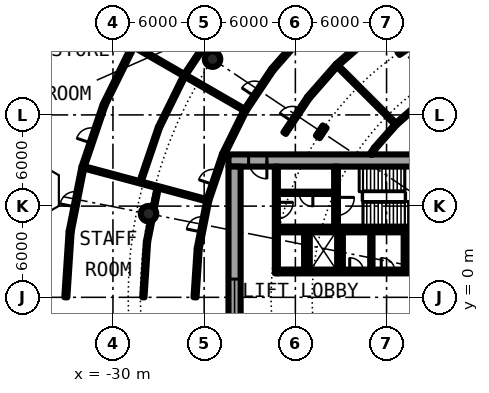
"""IFC4 building model, lengths in metres.
Left out: names, types, materials, properties, quantities, classifications, styles, units other than length and angle.
Written with IfcOpenShell. Run it as: python <this file> out.ifc"""

import sys

from ifc_helpers import new_model, si_unit, direction, frame, frame_2d, origin, origin_2d, place, context, subcontext, project, spatial, rectangle, hollow_circle, i_section, extrude, element, fill, save


model = new_model("IFC4")
c1 = context("Model", 3, precision=1e-05, world=origin(), true_north=direction((0.0, 1.0)))
c2 = subcontext(c1, "Body", "Model", "MODEL_VIEW")
j1 = project(units=[si_unit("LENGTHUNIT", "METRE"), si_unit("PLANEANGLEUNIT", "RADIAN")], contexts=[c1])
p1 = place(None, origin())
s1 = spatial("IfcSite", under=j1, at=p1, CompositionType="ELEMENT")
p2 = place(p1, origin())
s2 = spatial("IfcBuilding", under=s1, at=p2, CompositionType="ELEMENT")
p3 = place(p2, frame((0.0, 0.0, 5.4)))
s3 = spatial("IfcBuildingStorey", under=s2, at=p3, CompositionType="ELEMENT", Elevation=5.4)
for number, where, z_axis, x_axis in (
    (1, (-23.448, 15.667, 0.0), (0.0, 0.0, 1.0), (1.0, 0.0, 0.0)),
    (2, (-27.658, 5.501, 0.0), (0.0, 0.0, 1.0), (1.0, 0.0, 0.0)),
):
    element("IfcColumn", number, at=place(p3, frame(where, z_axis=z_axis, x_axis=x_axis)), inside=s3, PredefinedType="COLUMN", context=c2, shape_type="SweptSolid", body=[
        extrude(hollow_circle(Radius=0.508, WallThickness=0.05, at=origin_2d()), origin(), (0.0, 0.0, 1.0), 4.2),
    ])
for number, where, z_axis, x_axis in (
    (3, (-10.889, 16.297, 0.0), (0.0, 0.0, 1.0), (-0.556, 0.831, 0.0)),
    (4, (-16.297, 10.889, 0.0), (0.0, 0.0, 1.0), (-0.831, 0.556, 0.0)),
):
    element("IfcColumn", number, at=place(p3, frame(where, z_axis=z_axis, x_axis=x_axis)), inside=s3, PredefinedType="COLUMN", context=c2, shape_type="SweptSolid", body=[
        extrude(i_section(OverallWidth=0.303, OverallDepth=0.814, WebThickness=0.021, FlangeThickness=0.04, FilletRadius=0.03, at=origin_2d()), origin(), (0.0, 0.0, 1.0), 4.2),
    ])
p4 = place(p3, frame((-8.2, 9.0, 0.0), z_axis=(0.0, 0.0, 1.0), x_axis=(-1.0, 0.0, 0.0)))
e5 = element("IfcWall", 5, at=p4, inside=s3, PredefinedType="SHEAR", context=c2, shape_type="SweptSolid", body=[
    extrude(rectangle(XDim=14.2, YDim=0.8, at=frame_2d((7.1, 0.0))), origin(), (0.0, 0.0, 1.0), 4.2),
])
p5 = place(p4, frame((11.675, 0.0, 0.0)))
e6 = element("IfcOpeningElement", 6, at=p5, cuts=e5, PredefinedType="OPENING", context=c2, shape_type="SweptSolid", body=[
    extrude(rectangle(XDim=1.2, YDim=2.3, at=frame_2d((0.6, 1.15))), frame((0.0, 0.41, 0.0), z_axis=(0.0, -1.0, 0.0), x_axis=(1.0, 0.0, 0.0)), (0.0, 0.0, 1.0), 0.82),
])
p6 = place(p3, frame((-22.0, 8.6, 0.0), z_axis=(0.0, 0.0, 1.0), x_axis=(0.0, -1.0, 0.0)))
e7 = element("IfcWall", 7, at=p6, inside=s3, PredefinedType="SHEAR", context=c2, shape_type="SweptSolid", body=[
    extrude(rectangle(XDim=17.2, YDim=0.8, at=frame_2d((8.6, 0.0))), origin(), (0.0, 0.0, 1.0), 4.2),
])
p7 = place(p6, frame((7.4, 0.0, 0.1)))
e8 = element("IfcOpeningElement", 8, at=p7, cuts=e7, PredefinedType="OPENING", context=c2, shape_type="SweptSolid", body=[
    extrude(rectangle(XDim=2.4, YDim=2.2, at=frame_2d((1.2, 1.1))), frame((0.0, 0.41, 0.0), z_axis=(0.0, -1.0, 0.0), x_axis=(1.0, 0.0, 0.0)), (0.0, 0.0, 1.0), 0.82),
])
p8 = place(p3, frame((-19.15, 1.7, 0.0), z_axis=(0.0, 0.0, 1.0), x_axis=(1.0, 0.0, 0.0)))
e9 = element("IfcWall", 9, at=p8, inside=s3, PredefinedType="SHEAR", context=c2, shape_type="SweptSolid", body=[
    extrude(rectangle(XDim=10.15, YDim=0.25, at=frame_2d((5.075, 0.0))), origin(), (0.0, 0.0, 1.0), 4.2),
])
p9 = place(p8, frame((2.45, 0.0, 0.0)))
e10 = element("IfcOpeningElement", 10, at=p9, cuts=e9, PredefinedType="OPENING", context=c2, shape_type="SweptSolid", body=[
    extrude(rectangle(XDim=1.1, YDim=2.3, at=frame_2d((0.55, 1.15))), frame((0.0, 0.135, 0.0), z_axis=(0.0, -1.0, 0.0), x_axis=(1.0, 0.0, 0.0)), (0.0, 0.0, 1.0), 0.27),
])
p10 = place(p8, frame((8.837, 0.0, 0.0)))
e11 = element("IfcOpeningElement", 11, at=p10, cuts=e9, PredefinedType="OPENING", context=c2, shape_type="SweptSolid", body=[
    extrude(rectangle(XDim=0.9, YDim=2.3, at=frame_2d((0.45, 1.15))), frame((0.0, 0.135, 0.0), z_axis=(0.0, -1.0, 0.0), x_axis=(1.0, 0.0, 0.0)), (0.0, 0.0, 1.0), 0.27),
])
p11 = place(p8, frame((6.8, 0.0, 0.0)))
e12 = element("IfcOpeningElement", 12, at=p11, cuts=e9, PredefinedType="OPENING", context=c2, shape_type="SweptSolid", body=[
    extrude(rectangle(XDim=0.9, YDim=2.3, at=frame_2d((0.45, 1.15))), frame((0.0, 0.135, 0.0), z_axis=(0.0, -1.0, 0.0), x_axis=(1.0, 0.0, 0.0)), (0.0, 0.0, 1.0), 0.27),
])
p12 = place(p8, frame((4.725, 0.0, 0.0)))
e13 = element("IfcOpeningElement", 13, at=p12, cuts=e9, PredefinedType="OPENING", context=c2, shape_type="SweptSolid", body=[
    extrude(rectangle(XDim=0.9, YDim=2.3, at=frame_2d((0.45, 1.15))), frame((0.0, 0.135, 0.0), z_axis=(0.0, -1.0, 0.0), x_axis=(1.0, 0.0, 0.0)), (0.0, 0.0, 1.0), 0.27),
])
p13 = place(p3, frame((-9.0, 4.462, 0.0), z_axis=(0.0, 0.0, 1.0), x_axis=(-1.0, 0.0, 0.0)))
e14 = element("IfcWall", 14, at=p13, inside=s3, PredefinedType="SHEAR", context=c2, shape_type="SweptSolid", body=[
    extrude(rectangle(XDim=10.15, YDim=0.375, at=frame_2d((5.075, 0.0))), origin(), (0.0, 0.0, 1.0), 4.2),
])
p14 = place(p3, frame((-15.325, 8.6, 0.0), z_axis=(0.0, 0.0, 1.0), x_axis=(0.0, -1.0, 0.0)))
e15 = element("IfcWall", 15, at=p14, inside=s3, PredefinedType="SHEAR", context=c2, shape_type="SweptSolid", body=[
    extrude(rectangle(XDim=3.95, YDim=0.25, at=frame_2d((1.975, 0.0))), origin(), (0.0, 0.0, 1.0), 4.2),
])
p15 = place(p14, frame((2.025, 0.0, 0.0)))
e16 = element("IfcOpeningElement", 16, at=p15, cuts=e15, PredefinedType="OPENING", context=c2, shape_type="SweptSolid", body=[
    extrude(rectangle(XDim=1.2, YDim=2.3, at=frame_2d((0.6, 1.15))), frame((0.0, 0.135, 0.0), z_axis=(0.0, -1.0, 0.0), x_axis=(1.0, 0.0, 0.0)), (0.0, 0.0, 1.0), 0.27),
])
for number, where, z_axis, x_axis in (
    (17, (-15.0, 1.825, 0.0), (0.0, 0.0, 1.0), (0.0, 1.0, 0.0)),
    (18, (-17.3, 1.825, 0.0), (0.0, 0.0, 1.0), (0.0, 1.0, 0.0)),
):
    element("IfcWall", number, at=place(p3, frame(where, z_axis=z_axis, x_axis=x_axis)), inside=s3, PredefinedType="SOLIDWALL", context=c2, shape_type="SweptSolid", body=[
        extrude(rectangle(XDim=2.45, YDim=0.25, at=frame_2d((1.225, 0.0))), origin(), (0.0, 0.0, 1.0), 3.7),
    ])
p16 = place(p3, frame((-19.25, 8.6, 0.0), z_axis=(0.0, 0.0, 1.0), x_axis=(0.0, -1.0, 0.0)))
e19 = element("IfcWall", 19, at=p16, inside=s3, PredefinedType="SOLIDWALL", context=c2, shape_type="SweptSolid", body=[
    extrude(rectangle(XDim=7.025, YDim=0.2, at=frame_2d((3.513, 0.0))), origin(), (0.0, 0.0, 1.0), 3.7),
])
p17 = place(p16, frame((2.35, 0.0, 0.0)))
e20 = element("IfcOpeningElement", 20, at=p17, cuts=e19, PredefinedType="OPENING", context=c2, shape_type="SweptSolid", body=[
    extrude(rectangle(XDim=1.1, YDim=2.3, at=frame_2d((0.55, 1.15))), frame((0.0, 0.11, 0.0), z_axis=(0.0, -1.0, 0.0), x_axis=(1.0, 0.0, 0.0)), (0.0, 0.0, 1.0), 0.22),
])
for number, where, z_axis, x_axis in (
    (21, (-10.8, 1.825, 0.0), (0.0, 0.0, 1.0), (0.0, 1.0, 0.0)),
    (22, (-13.0, 1.825, 0.0), (0.0, 0.0, 1.0), (0.0, 1.0, 0.0)),
):
    element("IfcWall", number, at=place(p3, frame(where, z_axis=z_axis, x_axis=x_axis)), inside=s3, PredefinedType="PARTITIONING", context=c2, shape_type="SweptSolid", body=[
        extrude(rectangle(XDim=2.45, YDim=0.15, at=frame_2d((1.225, 0.0))), origin(), (0.0, 0.0, 1.0), 3.7),
    ])
p18 = place(p3, frame((-15.45, 6.875, 0.0), z_axis=(0.0, 0.0, 1.0), x_axis=(-1.0, 0.0, 0.0)))
e23 = element("IfcWall", 23, at=p18, inside=s3, PredefinedType="PARTITIONING", context=c2, shape_type="SweptSolid", body=[
    extrude(rectangle(XDim=3.7, YDim=0.15, at=frame_2d((1.85, 0.0))), origin(), (0.0, 0.0, 1.0), 3.7),
])
p19 = place(p18, frame((1.4, 0.0, 0.0)))
e24 = element("IfcOpeningElement", 24, at=p19, cuts=e23, PredefinedType="OPENING", context=c2, shape_type="SweptSolid", body=[
    extrude(rectangle(XDim=0.9, YDim=2.3, at=frame_2d((0.45, 1.15))), frame((0.0, 0.085, 0.0), z_axis=(0.0, -1.0, 0.0), x_axis=(1.0, 0.0, 0.0)), (0.0, 0.0, 1.0), 0.17),
])
for number, where, z_axis, x_axis in (
    (25, (-31.972, 8.568, 0.0), (0.0, 0.0, 1.0), (0.966, -0.259, 0.0)),
    (26, (-28.665, 16.55, 0.0), (0.0, 0.0, 1.0), (0.866, -0.5, 0.0)),
):
    element("IfcWall", number, at=place(p3, frame(where, z_axis=z_axis, x_axis=x_axis)), inside=s3, PredefinedType="PARTITIONING", context=c2, shape_type="SweptSolid", body=[
        extrude(rectangle(XDim=8.5, YDim=0.15, at=frame_2d((4.25, 0.0))), origin(), (0.0, 0.0, 1.0), 3.7),
    ])
p20 = place(p3, frame((-15.274, 15.274, 0.0), z_axis=(0.0, 0.0, 1.0), x_axis=(0.707106781187, -0.707106781187, 0.0)))
e27 = element("IfcWall", 27, at=p20, inside=s3, PredefinedType="PARTITIONING", context=c2, shape_type="SweptSolid", body=[
    extrude(rectangle(XDim=5.501, YDim=0.15, at=frame_2d((2.75, 0.0))), origin(), (0.0, 0.0, 1.0), 3.7),
])
p21 = place(p3, frame((-10.8, 18.706, 0.0), z_axis=(0.0, 0.0, 1.0), x_axis=(0.499882580657, -0.866093185261, 0.0)))
e28 = element("IfcWall", 28, at=p21, inside=s3, PredefinedType="PARTITIONING", context=c2, shape_type="SweptSolid", body=[
    extrude(rectangle(XDim=5.499, YDim=0.15, at=frame_2d((2.75, 0.0))), origin(), (0.0, 0.0, 1.0), 3.7),
])
p22 = place(p3, frame((-13.041, 9.4, 0.0), z_axis=(0.0, 0.0, 1.0), x_axis=(0.555634077892, 0.831426948977, 0.0)))
e29 = element("IfcWall", 29, at=p22, inside=s3, PredefinedType="PARTITIONING", context=c2, shape_type="SweptSolid", body=[
    extrude(rectangle(XDim=0.482, YDim=0.15, at=frame_2d((0.241, 0.0))), origin(), (0.0, 0.0, 1.0), 3.7),
])
for number, where, z_axis, x_axis in (
    (30, (-12.773, 9.801, 0.0), (0.0, 0.0, 1.0), (0.66, 0.752, 0.0)),
    (31, (-11.384, 11.384, 0.0), (0.0, 0.0, 1.0), (0.752, 0.66, 0.0)),
):
    element("IfcWall", number, at=place(p3, frame(where, z_axis=z_axis, x_axis=x_axis)), inside=s3, PredefinedType="PARTITIONING", context=c2, shape_type="SweptSolid", body=[
        extrude(rectangle(XDim=2.106, YDim=0.15, at=frame_2d((1.053, 0.0))), origin(), (0.0, 0.0, 1.0), 3.7),
    ])
p23 = place(p3, frame((-18.706, 10.8, 0.0), z_axis=(0.0, 0.0, 1.0), x_axis=(0.55571678686, 0.831371669473, 0.0)))
e32 = element("IfcWall", 32, at=p23, inside=s3, PredefinedType="PARTITIONING", context=c2, shape_type="SweptSolid", body=[
    extrude(rectangle(XDim=2.825, YDim=0.2, at=frame_2d((1.413, 0.0))), origin(), (0.0, 0.0, 1.0), 3.7),
])
p24 = place(p23, frame((0.913, 0.0, 0.0)))
e33 = element("IfcOpeningElement", 33, at=p24, cuts=e32, PredefinedType="OPENING", context=c2, shape_type="SweptSolid", body=[
    extrude(rectangle(XDim=1.0, YDim=2.3, at=frame_2d((0.5, 1.15))), frame((0.0, 0.11, 0.0), z_axis=(0.0, -1.0, 0.0), x_axis=(1.0, 0.0, 0.0)), (0.0, 0.0, 1.0), 0.22),
])
for number, where, z_axis, x_axis in (
    (34, (-17.136, 13.149, 0.0), (0.0, 0.0, 1.0), (0.659, 0.752, 0.0)),
    (35, (-15.274, 15.274, 0.0), (0.0, 0.0, 1.0), (0.752, 0.659, 0.0)),
):
    element("IfcWall", number, at=place(p3, frame(where, z_axis=z_axis, x_axis=x_axis)), inside=s3, PredefinedType="PARTITIONING", context=c2, shape_type="SweptSolid", body=[
        extrude(rectangle(XDim=2.825, YDim=0.2, at=frame_2d((1.413, 0.0))), origin(), (0.0, 0.0, 1.0), 3.7),
    ])
p25 = place(p3, frame((-24.6, 0.0, 0.0), z_axis=(0.0, 0.0, 1.0), x_axis=(0.06532549509, 0.997864008616, 0.0)))
e36 = element("IfcWall", 36, at=p25, inside=s3, PredefinedType="PARTITIONING", context=c2, shape_type="SweptSolid", body=[
    extrude(rectangle(XDim=3.218, YDim=0.2, at=frame_2d((1.609, 0.0))), origin(), (0.0, 0.0, 1.0), 3.7),
])
p26 = place(p3, frame((-24.39, 3.211, 0.0), z_axis=(0.0, 0.0, 1.0), x_axis=(0.195138477717, 0.98077570041, 0.0)))
e37 = element("IfcWall", 37, at=p26, inside=s3, PredefinedType="PARTITIONING", context=c2, shape_type="SweptSolid", body=[
    extrude(rectangle(XDim=3.218, YDim=0.2, at=frame_2d((1.609, 0.0))), origin(), (0.0, 0.0, 1.0), 3.7),
])
p27 = place(p26, frame((1.109, 0.0, 0.0)))
e38 = element("IfcOpeningElement", 38, at=p27, cuts=e37, PredefinedType="OPENING", context=c2, shape_type="SweptSolid", body=[
    extrude(rectangle(XDim=1.0, YDim=2.3, at=frame_2d((0.5, 1.15))), frame((0.0, 0.11, 0.0), z_axis=(0.0, -1.0, 0.0), x_axis=(1.0, 0.0, 0.0)), (0.0, 0.0, 1.0), 0.22),
])
p28 = place(p3, frame((-23.762, 6.367, 0.0), z_axis=(0.0, 0.0, 1.0), x_axis=(0.321593976879, 0.946877665823, 0.0)))
e39 = element("IfcWall", 39, at=p28, inside=s3, PredefinedType="PARTITIONING", context=c2, shape_type="SweptSolid", body=[
    extrude(rectangle(XDim=3.218, YDim=0.2, at=frame_2d((1.609, 0.0))), origin(), (0.0, 0.0, 1.0), 3.7),
])
p29 = place(p28, frame((1.109, 0.0, 0.0)))
e40 = element("IfcOpeningElement", 40, at=p29, cuts=e39, PredefinedType="OPENING", context=c2, shape_type="SweptSolid", body=[
    extrude(rectangle(XDim=1.0, YDim=2.3, at=frame_2d((0.5, 1.15))), frame((0.0, 0.11, 0.0), z_axis=(0.0, -1.0, 0.0), x_axis=(1.0, 0.0, 0.0)), (0.0, 0.0, 1.0), 0.22),
])
p30 = place(p3, frame((-22.727, 9.414, 0.0), z_axis=(0.0, 0.0, 1.0), x_axis=(0.442259878763, 0.896886949195, 0.0)))
e41 = element("IfcWall", 41, at=p30, inside=s3, PredefinedType="PARTITIONING", context=c2, shape_type="SweptSolid", body=[
    extrude(rectangle(XDim=3.218, YDim=0.2, at=frame_2d((1.609, 0.0))), origin(), (0.0, 0.0, 1.0), 3.7),
])
p31 = place(p3, frame((-21.304, 12.3, 0.0), z_axis=(0.0, 0.0, 1.0), x_axis=(0.555522714148, 0.831501361433, 0.0)))
e42 = element("IfcWall", 42, at=p31, inside=s3, PredefinedType="PARTITIONING", context=c2, shape_type="SweptSolid", body=[
    extrude(rectangle(XDim=3.218, YDim=0.2, at=frame_2d((1.609, 0.0))), origin(), (0.0, 0.0, 1.0), 3.7),
])
p32 = place(p31, frame((1.109, 0.0, 0.0)))
e43 = element("IfcOpeningElement", 43, at=p32, cuts=e42, PredefinedType="OPENING", context=c2, shape_type="SweptSolid", body=[
    extrude(rectangle(XDim=1.0, YDim=2.3, at=frame_2d((0.5, 1.15))), frame((0.0, 0.11, 0.0), z_axis=(0.0, -1.0, 0.0), x_axis=(1.0, 0.0, 0.0)), (0.0, 0.0, 1.0), 0.22),
])
p33 = place(p3, frame((-19.516, 14.976, 0.0), z_axis=(0.0, 0.0, 1.0), x_axis=(0.659299366608, 0.751880539175, 0.0)))
e44 = element("IfcWall", 44, at=p33, inside=s3, PredefinedType="PARTITIONING", context=c2, shape_type="SweptSolid", body=[
    extrude(rectangle(XDim=3.217, YDim=0.2, at=frame_2d((1.609, 0.0))), origin(), (0.0, 0.0, 1.0), 3.7),
])
p34 = place(p3, frame((-28.0, 0.0, 0.0), z_axis=(0.0, 0.0, 1.0), x_axis=(0.065519192905, 0.997851309245, 0.0)))
e45 = element("IfcWall", 45, at=p34, inside=s3, PredefinedType="PARTITIONING", context=c2, shape_type="SweptSolid", body=[
    extrude(rectangle(XDim=3.663, YDim=0.15, at=frame_2d((1.832, 0.0))), origin(), (0.0, 0.0, 1.0), 3.08),
])
p35 = place(p3, frame((-27.76, 3.655, 0.0), z_axis=(0.0, 0.0, 1.0), x_axis=(0.195109207038, 0.98078152375, 0.0)))
e46 = element("IfcWall", 46, at=p35, inside=s3, PredefinedType="PARTITIONING", context=c2, shape_type="SweptSolid", body=[
    extrude(rectangle(XDim=1.399, YDim=0.15, at=frame_2d((0.699, 0.0))), origin(), (0.0, 0.0, 1.0), 3.08),
])
p36 = place(p3, frame((-27.319, 5.874, 0.0), z_axis=(0.0, 0.0, 1.0), x_axis=(0.19514347376, 0.980774706367, 0.0)))
e47 = element("IfcWall", 47, at=p36, inside=s3, PredefinedType="PARTITIONING", context=c2, shape_type="SweptSolid", body=[
    extrude(rectangle(XDim=1.4, YDim=0.15, at=frame_2d((0.7, 0.0))), origin(), (0.0, 0.0, 1.0), 3.08),
])
p37 = place(p3, frame((-28.205, 7.558, 0.0), z_axis=(0.0, 0.0, 1.0), x_axis=(0.321573774313, 0.946884527107, 0.0)))
e48 = element("IfcWall", 48, at=p37, inside=s3, PredefinedType="PARTITIONING", context=c2, shape_type="SweptSolid", body=[
    extrude(rectangle(XDim=3.819, YDim=0.15, at=frame_2d((1.909, 0.0))), origin(), (0.0, 0.0, 1.0), 3.7),
])
p38 = place(p3, frame((-26.977, 11.174, 0.0), z_axis=(0.0, 0.0, 1.0), x_axis=(0.442169935194, 0.896931295256, 0.0)))
e49 = element("IfcWall", 49, at=p38, inside=s3, PredefinedType="PARTITIONING", context=c2, shape_type="SweptSolid", body=[
    extrude(rectangle(XDim=3.82, YDim=0.15, at=frame_2d((1.91, 0.0))), origin(), (0.0, 0.0, 1.0), 3.7),
])
p39 = place(p3, frame((-25.288, 14.6, 0.0), z_axis=(0.0, 0.0, 1.0), x_axis=(0.555584916278, 0.831459801075, 0.0)))
e50 = element("IfcWall", 50, at=p39, inside=s3, PredefinedType="PARTITIONING", context=c2, shape_type="SweptSolid", body=[
    extrude(rectangle(XDim=3.82, YDim=0.15, at=frame_2d((1.91, 0.0))), origin(), (0.0, 0.0, 1.0), 3.7),
])
p40 = place(p3, frame((-33.1, 0.0, 0.0), z_axis=(0.0, 0.0, 1.0), x_axis=(0.065414832499, 0.997858156097, 0.0)))
e51 = element("IfcWall", 51, at=p40, inside=s3, PredefinedType="PARTITIONING", context=c2, shape_type="SweptSolid", body=[
    extrude(rectangle(XDim=4.329, YDim=0.2, at=frame_2d((2.165, 0.0))), origin(), (0.0, 0.0, 1.0), 3.7),
])
p41 = place(p3, frame((-32.817, 4.32, 0.0), z_axis=(0.0, 0.0, 1.0), x_axis=(0.195140185298, 0.980775360662, 0.0)))
e52 = element("IfcWall", 52, at=p41, inside=s3, PredefinedType="PARTITIONING", context=c2, shape_type="SweptSolid", body=[
    extrude(rectangle(XDim=4.33, YDim=0.2, at=frame_2d((2.165, 0.0))), origin(), (0.0, 0.0, 1.0), 3.7),
])
p42 = place(p41, frame((1.665, 0.0, 0.0)))
e53 = element("IfcOpeningElement", 53, at=p42, cuts=e52, PredefinedType="OPENING", context=c2, shape_type="SweptSolid", body=[
    extrude(rectangle(XDim=1.0, YDim=2.3, at=frame_2d((0.5, 1.15))), frame((0.0, 0.11, 0.0), z_axis=(0.0, -1.0, 0.0), x_axis=(1.0, 0.0, 0.0)), (0.0, 0.0, 1.0), 0.22),
])
p43 = place(p3, frame((-31.972, 8.567, 0.0), z_axis=(0.0, 0.0, 1.0), x_axis=(0.3214498388, 0.946926608104, 0.0)))
e54 = element("IfcWall", 54, at=p43, inside=s3, PredefinedType="PARTITIONING", context=c2, shape_type="SweptSolid", body=[
    extrude(rectangle(XDim=4.33, YDim=0.2, at=frame_2d((2.165, 0.0))), origin(), (0.0, 0.0, 1.0), 3.7),
])
p44 = place(p43, frame((1.665, 0.0, 0.0)))
e55 = element("IfcOpeningElement", 55, at=p44, cuts=e54, PredefinedType="OPENING", context=c2, shape_type="SweptSolid", body=[
    extrude(rectangle(XDim=1.0, YDim=2.3, at=frame_2d((0.5, 1.15))), frame((0.0, 0.11, 0.0), z_axis=(0.0, -1.0, 0.0), x_axis=(1.0, 0.0, 0.0)), (0.0, 0.0, 1.0), 0.22),
])
p45 = place(p3, frame((-30.58, 12.667, 0.0), z_axis=(0.0, 0.0, 1.0), x_axis=(0.442312366853, 0.89686106512, 0.0)))
e56 = element("IfcWall", 56, at=p45, inside=s3, PredefinedType="PARTITIONING", context=c2, shape_type="SweptSolid", body=[
    extrude(rectangle(XDim=4.33, YDim=0.2, at=frame_2d((2.165, 0.0))), origin(), (0.0, 0.0, 1.0), 3.7),
])
p46 = place(p9, origin())
e57 = element("IfcDoor", 57, at=p46, inside=s3, OperationType="DOUBLE_DOOR_SLIDING", PredefinedType="DOOR", context=c2, shape_type="SweptSolid", body=[
    extrude(rectangle(XDim=1.1, YDim=2.3, at=frame_2d((0.55, 1.15))), frame((0.0, 0.025, 0.0), z_axis=(0.0, -1.0, 0.0), x_axis=(1.0, 0.0, 0.0)), (0.0, 0.0, 1.0), 0.05),
])
fill(e10, e57)
p47 = place(p11, origin())
e58 = element("IfcDoor", 58, at=p47, inside=s3, OperationType="SINGLE_SWING_LEFT", PredefinedType="DOOR", context=c2, shape_type="SweptSolid", body=[
    extrude(rectangle(XDim=0.9, YDim=2.3, at=frame_2d((0.45, 1.15))), frame((0.0, 0.025, 0.0), z_axis=(0.0, -1.0, 0.0), x_axis=(1.0, 0.0, 0.0)), (0.0, 0.0, 1.0), 0.05),
])
fill(e12, e58)
p48 = place(p12, origin())
e59 = element("IfcDoor", 59, at=p48, inside=s3, OperationType="SINGLE_SWING_LEFT", PredefinedType="DOOR", context=c2, shape_type="SweptSolid", body=[
    extrude(rectangle(XDim=0.9, YDim=2.3, at=frame_2d((0.45, 1.15))), frame((0.0, 0.025, 0.0), z_axis=(0.0, -1.0, 0.0), x_axis=(1.0, 0.0, 0.0)), (0.0, 0.0, 1.0), 0.05),
])
fill(e13, e59)
p49 = place(p19, origin())
e60 = element("IfcDoor", 60, at=p49, inside=s3, OperationType="SINGLE_SWING_LEFT", PredefinedType="DOOR", context=c2, shape_type="SweptSolid", body=[
    extrude(rectangle(XDim=0.9, YDim=2.3, at=frame_2d((0.45, 1.15))), frame((0.0, 0.025, 0.0), z_axis=(0.0, -1.0, 0.0), x_axis=(1.0, 0.0, 0.0)), (0.0, 0.0, 1.0), 0.05),
])
fill(e24, e60)
p50 = place(p15, origin())
e61 = element("IfcDoor", 61, at=p50, inside=s3, OperationType="SINGLE_SWING_LEFT", PredefinedType="DOOR", context=c2, shape_type="SweptSolid", body=[
    extrude(rectangle(XDim=1.2, YDim=2.3, at=frame_2d((0.6, 1.15))), frame((0.0, 0.025, 0.0), z_axis=(0.0, -1.0, 0.0), x_axis=(1.0, 0.0, 0.0)), (0.0, 0.0, 1.0), 0.05),
])
fill(e16, e61)
p51 = place(p17, origin())
e62 = element("IfcDoor", 62, at=p51, inside=s3, OperationType="SINGLE_SWING_RIGHT", PredefinedType="DOOR", context=c2, shape_type="SweptSolid", body=[
    extrude(rectangle(XDim=1.1, YDim=2.3, at=frame_2d((0.55, 1.15))), frame((0.0, 0.025, 0.0), z_axis=(0.0, -1.0, 0.0), x_axis=(1.0, 0.0, 0.0)), (0.0, 0.0, 1.0), 0.05),
])
fill(e20, e62)
p52 = place(p5, origin())
e63 = element("IfcDoor", 63, at=p52, inside=s3, OperationType="SINGLE_SWING_LEFT", PredefinedType="DOOR", context=c2, shape_type="SweptSolid", body=[
    extrude(rectangle(XDim=1.2, YDim=2.3, at=frame_2d((0.6, 1.15))), frame((0.0, 0.025, 0.0), z_axis=(0.0, -1.0, 0.0), x_axis=(1.0, 0.0, 0.0)), (0.0, 0.0, 1.0), 0.05),
])
fill(e6, e63)
p53 = place(p7, origin())
e64 = element("IfcWindow", 64, at=p53, inside=s3, PartitioningType="SINGLE_PANEL", PredefinedType="WINDOW", context=c2, shape_type="SweptSolid", body=[
    extrude(rectangle(XDim=2.4, YDim=2.2, at=frame_2d((1.2, 1.1))), frame((0.0, 0.03, 0.0), z_axis=(0.0, -1.0, 0.0), x_axis=(1.0, 0.0, 0.0)), (0.0, 0.0, 1.0), 0.06),
])
fill(e8, e64)
p54 = place(p24, origin())
e65 = element("IfcDoor", 65, at=p54, inside=s3, OperationType="SINGLE_SWING_RIGHT", PredefinedType="DOOR", context=c2, shape_type="SweptSolid", body=[
    extrude(rectangle(XDim=1.0, YDim=2.3, at=frame_2d((0.5, 1.15))), frame((0.0, 0.025, 0.0), z_axis=(0.0, -1.0, 0.0), x_axis=(1.0, 0.0, 0.0)), (0.0, 0.0, 1.0), 0.05),
])
fill(e33, e65)
p55 = place(p32, origin())
e66 = element("IfcDoor", 66, at=p55, inside=s3, OperationType="SINGLE_SWING_LEFT", PredefinedType="DOOR", context=c2, shape_type="SweptSolid", body=[
    extrude(rectangle(XDim=1.0, YDim=2.3, at=frame_2d((0.5, 1.15))), frame((0.0, 0.025, 0.0), z_axis=(0.0, -1.0, 0.0), x_axis=(1.0, 0.0, 0.0)), (0.0, 0.0, 1.0), 0.05),
])
fill(e43, e66)
p56 = place(p29, origin())
e67 = element("IfcDoor", 67, at=p56, inside=s3, OperationType="SINGLE_SWING_LEFT", PredefinedType="DOOR", context=c2, shape_type="SweptSolid", body=[
    extrude(rectangle(XDim=1.0, YDim=2.3, at=frame_2d((0.5, 1.15))), frame((0.0, 0.025, 0.0), z_axis=(0.0, -1.0, 0.0), x_axis=(1.0, 0.0, 0.0)), (0.0, 0.0, 1.0), 0.05),
])
fill(e40, e67)
p57 = place(p44, origin())
e68 = element("IfcDoor", 68, at=p57, inside=s3, OperationType="SINGLE_SWING_RIGHT", PredefinedType="DOOR", context=c2, shape_type="SweptSolid", body=[
    extrude(rectangle(XDim=1.0, YDim=2.3, at=frame_2d((0.5, 1.15))), frame((0.0, 0.025, 0.0), z_axis=(0.0, -1.0, 0.0), x_axis=(1.0, 0.0, 0.0)), (0.0, 0.0, 1.0), 0.05),
])
fill(e55, e68)
p58 = place(p27, origin())
e69 = element("IfcDoor", 69, at=p58, inside=s3, OperationType="SINGLE_SWING_RIGHT", PredefinedType="DOOR", context=c2, shape_type="SweptSolid", body=[
    extrude(rectangle(XDim=1.0, YDim=2.3, at=frame_2d((0.5, 1.15))), frame((0.0, 0.025, 0.0), z_axis=(0.0, -1.0, 0.0), x_axis=(1.0, 0.0, 0.0)), (0.0, 0.0, 1.0), 0.05),
])
fill(e38, e69)
p59 = place(p42, origin())
e70 = element("IfcDoor", 70, at=p59, inside=s3, OperationType="SINGLE_SWING_RIGHT", PredefinedType="DOOR", context=c2, shape_type="SweptSolid", body=[
    extrude(rectangle(XDim=1.0, YDim=2.3, at=frame_2d((0.5, 1.15))), frame((0.0, 0.025, 0.0), z_axis=(0.0, -1.0, 0.0), x_axis=(1.0, 0.0, 0.0)), (0.0, 0.0, 1.0), 0.05),
])
fill(e53, e70)
save(model, sys.argv[1])
